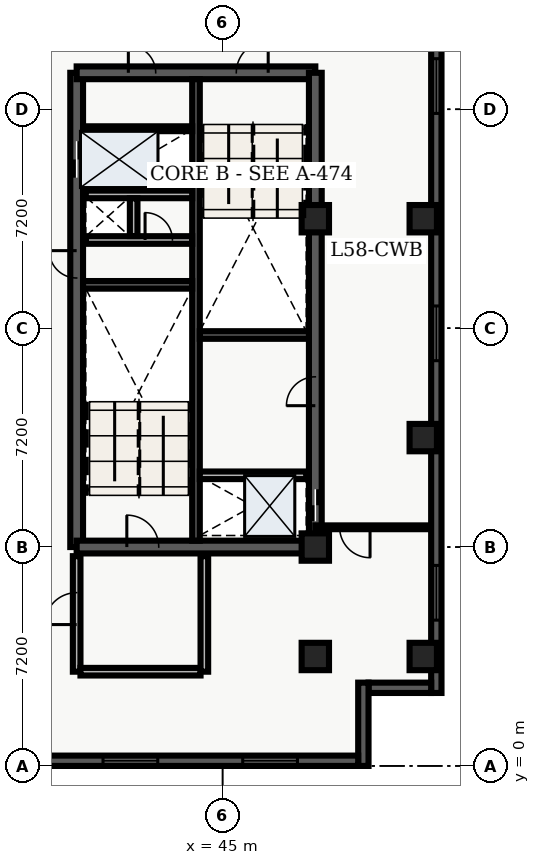
"""IFC4 building model, lengths in metres.
Left out: names, types, materials, properties, quantities, classifications, styles, units other than length and angle.
Written with IfcOpenShell. Run it as: python <this file> out.ifc"""

import sys

from ifc_helpers import new_model, entity, si_unit, converted_unit, direction, frame, origin_with_axes, origin_2d_with_axis, place, context, subcontext, project, spatial, polyline, rectangle, outline, extrude, element, fill, save


model = new_model("IFC4")
c1 = context("Model", 3, precision=1e-05, world=origin_with_axes(), true_north=direction((0.0, 1.0)))
c2 = subcontext(c1, "Body", "Model", "MODEL_VIEW")
j1 = project(units=[si_unit("LENGTHUNIT", "METRE"), converted_unit("PLANEANGLEUNIT", "DEGREE", entity("IfcPlaneAngleMeasure", 0.017), si_unit("PLANEANGLEUNIT", "RADIAN"), dimensions=[0, 0, 0, 0, 0, 0, 0])], contexts=[c1])
p1 = place(None, origin_with_axes())
s1 = spatial("IfcSite", under=j1, at=p1, CompositionType="ELEMENT")
p2 = place(p1, origin_with_axes())
s2 = spatial("IfcBuilding", under=s1, at=p2, CompositionType="ELEMENT")
p3 = place(p2, frame((0.0, 0.0, 236.4), z_axis=(0.0, 0.0, 1.0), x_axis=(1.0, 0.0, 0.0)))
s3 = spatial("IfcBuildingStorey", under=s2, at=p3, CompositionType="ELEMENT", Elevation=236.4)
p4 = place(p3, frame((40.2, 7.2, 0.0), z_axis=(0.0, 0.0, 1.0), x_axis=(0.0, 1.0, 0.0)))
e1 = element("IfcWall", 1, at=p4, inside=s3, PredefinedType="SHEAR", context=c2, shape_type="SweptSolid", body=[
    extrude(outline(polyline([(0.0, -0.21), (15.6, -0.21), (15.6, 0.21), (0.0, 0.21), (0.0, -0.21)])), origin_with_axes(), (0.0, 0.0, 1.0), 3.66),
])
p5 = place(p4, frame((12.75, 0.0, 0.0), z_axis=(0.0, 0.0, 1.0), x_axis=(1.0, 0.0, 0.0)))
e2 = element("IfcOpeningElement", 2, at=p5, cuts=e1, PredefinedType="OPENING", context=c2, shape_type="SweptSolid", body=[
    extrude(rectangle(XDim=1.2, YDim=0.44, at=origin_2d_with_axis()), origin_with_axes(), (0.0, 0.0, 1.0), 2.15),
])
p6 = place(p4, frame((9.3, 0.0, 0.0), z_axis=(0.0, 0.0, 1.0), x_axis=(1.0, 0.0, 0.0)))
e3 = element("IfcOpeningElement", 3, at=p6, cuts=e1, PredefinedType="OPENING", context=c2, shape_type="SweptSolid", body=[
    extrude(rectangle(XDim=0.9, YDim=0.44, at=origin_2d_with_axis()), origin_with_axes(), (0.0, 0.0, 1.0), 2.15),
])
p7 = place(p3, frame((40.2, 7.2, 0.0), z_axis=(0.0, 0.0, 1.0), x_axis=(1.0, 0.0, 0.0)))
e4 = element("IfcWall", 4, at=p7, inside=s3, PredefinedType="SHEAR", context=c2, shape_type="SweptSolid", body=[
    extrude(outline(polyline([(0.0, -0.21), (7.85, -0.21), (7.85, 0.21), (0.0, 0.21), (0.0, -0.21)])), origin_with_axes(), (0.0, 0.0, 1.0), 3.66),
])
p8 = place(p7, frame((2.175, 0.0, 0.0), z_axis=(0.0, 0.0, 1.0), x_axis=(1.0, 0.0, 0.0)))
e5 = element("IfcOpeningElement", 5, at=p8, cuts=e4, PredefinedType="OPENING", context=c2, shape_type="SweptSolid", body=[
    extrude(rectangle(XDim=1.05, YDim=0.44, at=origin_2d_with_axis()), origin_with_axes(), (0.0, 0.0, 1.0), 2.15),
])
p9 = place(p3, frame((40.2, 22.8, 0.0), z_axis=(0.0, 0.0, 1.0), x_axis=(1.0, 0.0, 0.0)))
e6 = element("IfcWall", 6, at=p9, inside=s3, PredefinedType="SHEAR", context=c2, shape_type="SweptSolid", body=[
    extrude(outline(polyline([(0.0, -0.21), (7.85, -0.21), (7.85, 0.21), (0.0, 0.21), (0.0, -0.21)])), origin_with_axes(), (0.0, 0.0, 1.0), 3.66),
])
p10 = place(p9, frame((5.775, 0.0, 0.0), z_axis=(0.0, 0.0, 1.0), x_axis=(1.0, 0.0, 0.0)))
e7 = element("IfcOpeningElement", 7, at=p10, cuts=e6, PredefinedType="OPENING", context=c2, shape_type="SweptSolid", body=[
    extrude(rectangle(XDim=1.05, YDim=0.44, at=origin_2d_with_axis()), origin_with_axes(), (0.0, 0.0, 1.0), 2.15),
])
p11 = place(p9, frame((2.15, 0.0, 0.0), z_axis=(0.0, 0.0, 1.0), x_axis=(1.0, 0.0, 0.0)))
e8 = element("IfcOpeningElement", 8, at=p11, cuts=e6, PredefinedType="OPENING", context=c2, shape_type="SweptSolid", body=[
    extrude(rectangle(XDim=0.9, YDim=0.44, at=origin_2d_with_axis()), origin_with_axes(), (0.0, 0.0, 1.0), 2.15),
])
p12 = place(p3, frame((48.05, 7.2, 0.0), z_axis=(0.0, 0.0, 1.0), x_axis=(0.0, 1.0, 0.0)))
e9 = element("IfcWall", 9, at=p12, inside=s3, PredefinedType="SHEAR", context=c2, shape_type="SweptSolid", body=[
    extrude(outline(polyline([(0.0, -0.21), (15.6, -0.21), (15.6, 0.21), (0.0, 0.21), (0.0, -0.21)])), origin_with_axes(), (0.0, 0.0, 1.0), 3.66),
])
p13 = place(p12, frame((1.375, 0.0, 0.0), z_axis=(0.0, 0.0, 1.0), x_axis=(1.0, 0.0, 0.0)))
e10 = element("IfcOpeningElement", 10, at=p13, cuts=e9, PredefinedType="OPENING", context=c2, shape_type="SweptSolid", body=[
    extrude(rectangle(XDim=1.05, YDim=0.44, at=origin_2d_with_axis()), origin_with_axes(), (0.0, 0.0, 1.0), 2.15),
])
p14 = place(p12, frame((5.125, 0.0, 0.0), z_axis=(0.0, 0.0, 1.0), x_axis=(1.0, 0.0, 0.0)))
e11 = element("IfcOpeningElement", 11, at=p14, cuts=e9, PredefinedType="OPENING", context=c2, shape_type="SweptSolid", body=[
    extrude(rectangle(XDim=0.95, YDim=0.44, at=origin_2d_with_axis()), origin_with_axes(), (0.0, 0.0, 1.0), 2.15),
])
p15 = place(p3, frame((44.125, 7.41, 0.0), z_axis=(0.0, 0.0, 1.0), x_axis=(0.0, 1.0, 0.0)))
e12 = element("IfcWall", 12, at=p15, inside=s3, PredefinedType="SHEAR", context=c2, shape_type="SweptSolid", body=[
    extrude(outline(polyline([(0.0, -0.125), (15.18, -0.125), (15.18, 0.125), (0.0, 0.125), (0.0, -0.125)])), origin_with_axes(), (0.0, 0.0, 1.0), 3.66),
])
for number, where, z_axis, x_axis in (
    (13, (40.41, 15.825, 0.0), (0.0, 0.0, 1.0), (1.0, 0.0, 0.0)),
    (14, (44.25, 14.175, 0.0), (0.0, 0.0, 1.0), (1.0, 0.0, 0.0)),
):
    element("IfcWall", number, at=place(p3, frame(where, z_axis=z_axis, x_axis=x_axis)), inside=s3, PredefinedType="SHEAR", context=c2, shape_type="SweptSolid", body=[
        extrude(outline(polyline([(0.0, -0.125), (3.59, -0.125), (3.59, 0.125), (0.0, 0.125), (0.0, -0.125)])), origin_with_axes(), (0.0, 0.0, 1.0), 3.66),
    ])
p16 = place(p3, frame((40.5, 17.3, 0.0), z_axis=(0.0, 0.0, 1.0), x_axis=(1.0, 0.0, 0.0)))
e15 = element("IfcWall", 15, at=p16, inside=s3, PredefinedType="SOLIDWALL", context=c2, shape_type="SweptSolid", body=[
    extrude(outline(polyline([(0.0, -0.125), (3.5, -0.125), (3.5, 0.125), (0.0, 0.125), (0.0, -0.125)])), origin_with_axes(), (0.0, 0.0, 1.0), 2.7),
])
p17 = place(p16, frame((2.4, 0.0, 0.0), z_axis=(0.0, 0.0, 1.0), x_axis=(1.0, 0.0, 0.0)))
e16 = element("IfcOpeningElement", 16, at=p17, cuts=e15, PredefinedType="OPENING", context=c2, shape_type="SweptSolid", body=[
    extrude(rectangle(XDim=0.9, YDim=0.27, at=origin_2d_with_axis()), origin_with_axes(), (0.0, 0.0, 1.0), 2.15),
])
p18 = place(p3, frame((40.5, 18.8, 0.0), z_axis=(0.0, 0.0, 1.0), x_axis=(1.0, 0.0, 0.0)))
e17 = element("IfcWall", 17, at=p18, inside=s3, PredefinedType="SOLIDWALL", context=c2, shape_type="SweptSolid", body=[
    extrude(outline(polyline([(0.0, -0.125), (3.5, -0.125), (3.5, 0.125), (0.0, 0.125), (0.0, -0.125)])), origin_with_axes(), (0.0, 0.0, 1.0), 2.7),
])
p19 = place(p3, frame((42.075, 17.43, 0.0), z_axis=(0.0, 0.0, 1.0), x_axis=(0.0, 1.0, 0.0)))
e18 = element("IfcWall", 18, at=p19, inside=s3, PredefinedType="SOLIDWALL", context=c2, shape_type="SweptSolid", body=[
    extrude(outline(polyline([(0.0, -0.125), (1.24, -0.125), (1.24, 0.125), (0.0, 0.125), (0.0, -0.125)])), origin_with_axes(), (0.0, 0.0, 1.0), 2.7),
])
p20 = place(p3, frame((40.2, 3.1, 0.0), z_axis=(0.0, 0.0, 1.0), x_axis=(0.0, 1.0, 0.0)))
e19 = element("IfcWall", 19, at=p20, inside=s3, PredefinedType="SOLIDWALL", context=c2, shape_type="SweptSolid", body=[
    extrude(outline(polyline([(0.0, -0.125), (3.8, -0.125), (3.8, 0.125), (0.0, 0.125), (0.0, -0.125)])), origin_with_axes(), (0.0, 0.0, 1.0), 2.7),
])
p21 = place(p20, frame((2.075, 0.0, 0.0), z_axis=(0.0, 0.0, 1.0), x_axis=(1.0, 0.0, 0.0)))
e20 = element("IfcOpeningElement", 20, at=p21, cuts=e19, PredefinedType="OPENING", context=c2, shape_type="SweptSolid", body=[
    extrude(rectangle(XDim=1.05, YDim=0.27, at=origin_2d_with_axis()), origin_with_axes(), (0.0, 0.0, 1.0), 2.15),
])
p22 = place(p3, frame((40.325, 3.1, 0.0), z_axis=(0.0, 0.0, 1.0), x_axis=(1.0, 0.0, 0.0)))
e21 = element("IfcWall", 21, at=p22, inside=s3, PredefinedType="SOLIDWALL", context=c2, shape_type="SweptSolid", body=[
    extrude(outline(polyline([(0.0, -0.125), (3.95, -0.125), (3.95, 0.125), (0.0, 0.125), (0.0, -0.125)])), origin_with_axes(), (0.0, 0.0, 1.0), 2.7),
])
p23 = place(p3, frame((44.4, 3.1, 0.0), z_axis=(0.0, 0.0, 1.0), x_axis=(0.0, 1.0, 0.0)))
e22 = element("IfcWall", 22, at=p23, inside=s3, PredefinedType="SOLIDWALL", context=c2, shape_type="SweptSolid", body=[
    extrude(outline(polyline([(0.0, -0.125), (3.8, -0.125), (3.8, 0.125), (0.0, 0.125), (0.0, -0.125)])), origin_with_axes(), (0.0, 0.0, 1.0), 2.7),
])
for number, where, z_axis, x_axis in (
    (23, (48.05, 3.6, 0.0), (0.0, 0.0, 1.0), (1.0, 0.0, 0.0)),
    (24, (48.05, 7.2, 0.0), (0.0, 0.0, 1.0), (1.0, 0.0, 0.0)),
    (25, (48.05, 18.0, 0.0), (0.0, 0.0, 1.0), (1.0, 0.0, 0.0)),
    (26, (51.6, 3.6, 0.0), (0.0, 0.0, 1.0), (1.0, 0.0, 0.0)),
    (27, (51.6, 10.8, 0.0), (0.0, 0.0, 1.0), (1.0, 0.0, 0.0)),
    (28, (51.6, 18.0, 0.0), (0.0, 0.0, 1.0), (1.0, 0.0, 0.0)),
):
    element("IfcColumn", number, at=place(p3, frame(where, z_axis=z_axis, x_axis=x_axis)), inside=s3, PredefinedType="COLUMN", context=c2, shape_type="SweptSolid", body=[
        extrude(rectangle(XDim=0.9, YDim=0.9, at=origin_2d_with_axis()), origin_with_axes(), (0.0, 0.0, 1.0), 3.9),
    ])
p24 = place(p3, frame((40.5, 20.96, 0.0), z_axis=(0.0, 0.0, 1.0), x_axis=(1.0, 0.0, 0.0)))
e29 = element("IfcWall", 29, at=p24, inside=s3, PredefinedType="PARTITIONING", context=c2, shape_type="SweptSolid", body=[
    extrude(outline(polyline([(0.0, -0.08), (3.5, -0.08), (3.5, 0.08), (0.0, 0.08), (0.0, -0.08)])), origin_with_axes(), (0.0, 0.0, 1.0), 2.7),
])
p25 = place(p3, frame((44.25, 9.56, 0.0), z_axis=(0.0, 0.0, 1.0), x_axis=(1.0, 0.0, 0.0)))
e30 = element("IfcWall", 30, at=p25, inside=s3, PredefinedType="SOLIDWALL", context=c2, shape_type="SweptSolid", body=[
    extrude(outline(polyline([(0.0, -0.125), (3.5, -0.125), (3.5, 0.125), (0.0, 0.125), (0.0, -0.125)])), origin_with_axes(), (0.0, 0.0, 1.0), 2.7),
])
p26 = place(p3, frame((51.865, 7.85, 0.0), z_axis=(0.0, 0.0, 1.0), x_axis=(-1.0, 0.0, 0.0)))
e31 = element("IfcWall", 31, at=p26, inside=s3, PredefinedType="PARTITIONING", context=c2, shape_type="SweptSolid", body=[
    extrude(outline(polyline([(0.0, -0.062), (3.815, -0.062), (3.815, 0.062), (0.0, 0.062), (0.0, -0.062)])), origin_with_axes(), (0.0, 0.0, 1.0), 2.7),
])
p27 = place(p26, frame((2.515, 0.0, 0.0), z_axis=(0.0, 0.0, 1.0), x_axis=(1.0, 0.0, 0.0)))
e32 = element("IfcOpeningElement", 32, at=p27, cuts=e31, PredefinedType="OPENING", context=c2, shape_type="SweptSolid", body=[
    extrude(rectangle(XDim=1.0, YDim=0.145, at=origin_2d_with_axis()), origin_with_axes(), (0.0, 0.0, 1.0), 2.15),
])
p28 = place(p3, frame((52.03, 26.06, 0.0), z_axis=(0.0, 0.0, 1.0), x_axis=(0.0, -1.0, 0.0)))
e33 = element("IfcWall", 33, at=p28, inside=s3, PredefinedType="SOLIDWALL", context=c2, shape_type="SweptSolid", body=[
    extrude(outline(polyline([(0.0, -0.17), (23.66, -0.17), (23.66, 0.17), (0.0, 0.17), (0.0, -0.17)])), origin_with_axes(), (0.0, 0.0, 1.0), 3.66),
])
p29 = place(p28, frame((3.696, 0.0, 0.45), z_axis=(0.0, 0.0, 1.0), x_axis=(1.0, 0.0, 0.0)))
e34 = element("IfcOpeningElement", 34, at=p29, cuts=e33, PredefinedType="OPENING", context=c2, shape_type="SweptSolid", body=[
    extrude(rectangle(XDim=1.8, YDim=0.36, at=origin_2d_with_axis()), origin_with_axes(), (0.0, 0.0, 1.0), 2.1),
])
p30 = place(p28, frame((11.83, 0.0, 0.45), z_axis=(0.0, 0.0, 1.0), x_axis=(1.0, 0.0, 0.0)))
e35 = element("IfcOpeningElement", 35, at=p30, cuts=e33, PredefinedType="OPENING", context=c2, shape_type="SweptSolid", body=[
    extrude(rectangle(XDim=1.8, YDim=0.36, at=origin_2d_with_axis()), origin_with_axes(), (0.0, 0.0, 1.0), 2.1),
])
p31 = place(p28, frame((20.364, 0.0, 0.45), z_axis=(0.0, 0.0, 1.0), x_axis=(1.0, 0.0, 0.0)))
e36 = element("IfcOpeningElement", 36, at=p31, cuts=e33, PredefinedType="OPENING", context=c2, shape_type="SweptSolid", body=[
    extrude(rectangle(XDim=1.8, YDim=0.36, at=origin_2d_with_axis()), origin_with_axes(), (0.0, 0.0, 1.0), 2.1),
])
p32 = place(p3, frame((51.86, 2.57, 0.0), z_axis=(0.0, 0.0, 1.0), x_axis=(-1.0, 0.0, 0.0)))
e37 = element("IfcWall", 37, at=p32, inside=s3, PredefinedType="SOLIDWALL", context=c2, shape_type="SweptSolid", body=[
    extrude(outline(polyline([(0.0, -0.17), (2.06, -0.17), (2.06, 0.17), (0.0, 0.17), (0.0, -0.17)])), origin_with_axes(), (0.0, 0.0, 1.0), 3.66),
])
p33 = place(p3, frame((49.63, 2.74, 0.0), z_axis=(0.0, 0.0, 1.0), x_axis=(0.0, -1.0, 0.0)))
e38 = element("IfcWall", 38, at=p33, inside=s3, PredefinedType="SOLIDWALL", context=c2, shape_type="SweptSolid", body=[
    extrude(outline(polyline([(0.0, -0.17), (2.74, -0.17), (2.74, 0.17), (0.0, 0.17), (0.0, -0.17)])), origin_with_axes(), (0.0, 0.0, 1.0), 3.66),
])
p34 = place(p3, frame((49.46, 0.17, 0.0), z_axis=(0.0, 0.0, 1.0), x_axis=(-1.0, 0.0, 0.0)))
e39 = element("IfcWall", 39, at=p34, inside=s3, PredefinedType="SOLIDWALL", context=c2, shape_type="SweptSolid", body=[
    extrude(outline(polyline([(0.0, -0.17), (42.56, -0.17), (42.56, 0.17), (0.0, 0.17), (0.0, -0.17)])), origin_with_axes(), (0.0, 0.0, 1.0), 3.66),
])
p35 = place(p34, frame((2.898, 0.0, 0.45), z_axis=(0.0, 0.0, 1.0), x_axis=(1.0, 0.0, 0.0)))
e40 = element("IfcOpeningElement", 40, at=p35, cuts=e39, PredefinedType="OPENING", context=c2, shape_type="SweptSolid", body=[
    extrude(rectangle(XDim=1.8, YDim=0.36, at=origin_2d_with_axis()), origin_with_axes(), (0.0, 0.0, 1.0), 2.1),
])
p36 = place(p34, frame((7.493, 0.0, 0.45), z_axis=(0.0, 0.0, 1.0), x_axis=(1.0, 0.0, 0.0)))
e41 = element("IfcOpeningElement", 41, at=p36, cuts=e39, PredefinedType="OPENING", context=c2, shape_type="SweptSolid", body=[
    extrude(rectangle(XDim=1.8, YDim=0.36, at=origin_2d_with_axis()), origin_with_axes(), (0.0, 0.0, 1.0), 2.1),
])
p37 = place(p34, frame((12.089, 0.0, 0.45), z_axis=(0.0, 0.0, 1.0), x_axis=(1.0, 0.0, 0.0)))
e42 = element("IfcOpeningElement", 42, at=p37, cuts=e39, PredefinedType="OPENING", context=c2, shape_type="SweptSolid", body=[
    extrude(rectangle(XDim=1.8, YDim=0.36, at=origin_2d_with_axis()), origin_with_axes(), (0.0, 0.0, 1.0), 2.1),
])
p38 = place(p34, frame((16.234, 0.0, 0.45), z_axis=(0.0, 0.0, 1.0), x_axis=(1.0, 0.0, 0.0)))
e43 = element("IfcOpeningElement", 43, at=p38, cuts=e39, PredefinedType="OPENING", context=c2, shape_type="SweptSolid", body=[
    extrude(rectangle(XDim=1.8, YDim=0.36, at=origin_2d_with_axis()), origin_with_axes(), (0.0, 0.0, 1.0), 2.1),
])
p39 = place(p34, frame((25.876, 0.0, 0.45), z_axis=(0.0, 0.0, 1.0), x_axis=(1.0, 0.0, 0.0)))
e44 = element("IfcOpeningElement", 44, at=p39, cuts=e39, PredefinedType="OPENING", context=c2, shape_type="SweptSolid", body=[
    extrude(rectangle(XDim=1.8, YDim=0.36, at=origin_2d_with_axis()), origin_with_axes(), (0.0, 0.0, 1.0), 2.1),
])
p40 = place(p34, frame((30.471, 0.0, 0.45), z_axis=(0.0, 0.0, 1.0), x_axis=(1.0, 0.0, 0.0)))
e45 = element("IfcOpeningElement", 45, at=p40, cuts=e39, PredefinedType="OPENING", context=c2, shape_type="SweptSolid", body=[
    extrude(rectangle(XDim=1.8, YDim=0.36, at=origin_2d_with_axis()), origin_with_axes(), (0.0, 0.0, 1.0), 2.1),
])
p41 = place(p34, frame((35.067, 0.0, 0.45), z_axis=(0.0, 0.0, 1.0), x_axis=(1.0, 0.0, 0.0)))
e46 = element("IfcOpeningElement", 46, at=p41, cuts=e39, PredefinedType="OPENING", context=c2, shape_type="SweptSolid", body=[
    extrude(rectangle(XDim=1.8, YDim=0.36, at=origin_2d_with_axis()), origin_with_axes(), (0.0, 0.0, 1.0), 2.1),
])
p42 = place(p34, frame((39.662, 0.0, 0.45), z_axis=(0.0, 0.0, 1.0), x_axis=(1.0, 0.0, 0.0)))
e47 = element("IfcOpeningElement", 47, at=p42, cuts=e39, PredefinedType="OPENING", context=c2, shape_type="SweptSolid", body=[
    extrude(rectangle(XDim=1.8, YDim=0.36, at=origin_2d_with_axis()), origin_with_axes(), (0.0, 0.0, 1.0), 2.1),
])
p43 = place(p12, frame((1.375, 0.0, 0.0), z_axis=(0.0, 0.0, 1.0), x_axis=(1.0, 0.0, 0.0)))
e48 = element("IfcDoor", 48, at=p43, inside=s3, OperationType="SLIDING_TO_LEFT", PredefinedType="DOOR", context=c2, shape_type="SweptSolid", body=[
    extrude(rectangle(XDim=1.05, YDim=0.09, at=origin_2d_with_axis()), origin_with_axes(), (0.0, 0.0, 1.0), 2.15),
])
fill(e10, e48)
p44 = place(p4, frame((12.75, 0.0, 0.0), z_axis=(0.0, 0.0, 1.0), x_axis=(1.0, 0.0, 0.0)))
e49 = element("IfcDoor", 49, at=p44, inside=s3, OperationType="DOUBLE_DOOR_SLIDING", PredefinedType="DOOR", context=c2, shape_type="SweptSolid", body=[
    extrude(rectangle(XDim=1.2, YDim=0.09, at=origin_2d_with_axis()), origin_with_axes(), (0.0, 0.0, 1.0), 2.15),
])
fill(e2, e49)
p45 = place(p4, frame((9.3, 0.0, 0.0), z_axis=(0.0, 0.0, 1.0), x_axis=(1.0, 0.0, 0.0)))
e50 = element("IfcDoor", 50, at=p45, inside=s3, OperationType="SINGLE_SWING_RIGHT", PredefinedType="DOOR", context=c2, shape_type="SweptSolid", body=[
    extrude(rectangle(XDim=0.9, YDim=0.09, at=origin_2d_with_axis()), origin_with_axes(), (0.0, 0.0, 1.0), 2.15),
])
fill(e3, e50)
p46 = place(p16, frame((2.4, 0.0, 0.0), z_axis=(0.0, 0.0, 1.0), x_axis=(1.0, 0.0, 0.0)))
e51 = element("IfcDoor", 51, at=p46, inside=s3, OperationType="SINGLE_SWING_LEFT", PredefinedType="DOOR", context=c2, shape_type="SweptSolid", body=[
    extrude(rectangle(XDim=0.9, YDim=0.09, at=origin_2d_with_axis()), origin_with_axes(), (0.0, 0.0, 1.0), 2.15),
])
fill(e16, e51)
p47 = place(p7, frame((2.175, 0.0, 0.0), z_axis=(0.0, 0.0, 1.0), x_axis=(1.0, 0.0, 0.0)))
e52 = element("IfcDoor", 52, at=p47, inside=s3, OperationType="SINGLE_SWING_LEFT", PredefinedType="DOOR", context=c2, shape_type="SweptSolid", body=[
    extrude(rectangle(XDim=1.05, YDim=0.09, at=origin_2d_with_axis()), origin_with_axes(), (0.0, 0.0, 1.0), 2.15),
])
fill(e5, e52)
p48 = place(p9, frame((5.775, 0.0, 0.0), z_axis=(0.0, 0.0, 1.0), x_axis=(1.0, 0.0, 0.0)))
e53 = element("IfcDoor", 53, at=p48, inside=s3, OperationType="SINGLE_SWING_RIGHT", PredefinedType="DOOR", context=c2, shape_type="SweptSolid", body=[
    extrude(rectangle(XDim=1.05, YDim=0.09, at=origin_2d_with_axis()), origin_with_axes(), (0.0, 0.0, 1.0), 2.15),
])
fill(e7, e53)
p49 = place(p20, frame((2.075, 0.0, 0.0), z_axis=(0.0, 0.0, 1.0), x_axis=(1.0, 0.0, 0.0)))
e54 = element("IfcDoor", 54, at=p49, inside=s3, OperationType="SINGLE_SWING_LEFT", PredefinedType="DOOR", context=c2, shape_type="SweptSolid", body=[
    extrude(rectangle(XDim=1.05, YDim=0.09, at=origin_2d_with_axis()), origin_with_axes(), (0.0, 0.0, 1.0), 2.15),
])
fill(e20, e54)
p50 = place(p9, frame((2.15, 0.0, 0.0), z_axis=(0.0, 0.0, 1.0), x_axis=(1.0, 0.0, 0.0)))
e55 = element("IfcDoor", 55, at=p50, inside=s3, OperationType="SINGLE_SWING_LEFT", PredefinedType="DOOR", context=c2, shape_type="SweptSolid", body=[
    extrude(rectangle(XDim=0.9, YDim=0.09, at=origin_2d_with_axis()), origin_with_axes(), (0.0, 0.0, 1.0), 2.15),
])
fill(e8, e55)
p51 = place(p12, frame((5.125, 0.0, 0.0), z_axis=(0.0, 0.0, 1.0), x_axis=(1.0, 0.0, 0.0)))
e56 = element("IfcDoor", 56, at=p51, inside=s3, OperationType="SINGLE_SWING_LEFT", PredefinedType="DOOR", context=c2, shape_type="SweptSolid", body=[
    extrude(rectangle(XDim=0.95, YDim=0.09, at=origin_2d_with_axis()), origin_with_axes(), (0.0, 0.0, 1.0), 2.15),
])
fill(e11, e56)
p52 = place(p26, frame((2.515, 0.0, 0.0), z_axis=(0.0, 0.0, 1.0), x_axis=(1.0, 0.0, 0.0)))
e57 = element("IfcDoor", 57, at=p52, inside=s3, OperationType="SINGLE_SWING_LEFT", PredefinedType="DOOR", context=c2, shape_type="SweptSolid", body=[
    extrude(rectangle(XDim=1.0, YDim=0.075, at=origin_2d_with_axis()), origin_with_axes(), (0.0, 0.0, 1.0), 2.15),
])
fill(e32, e57)
p53 = place(p28, frame((3.696, 0.0, 0.45), z_axis=(0.0, 0.0, 1.0), x_axis=(1.0, 0.0, 0.0)))
e58 = element("IfcWindow", 58, at=p53, inside=s3, PredefinedType="WINDOW", context=c2, shape_type="SweptSolid", body=[
    extrude(rectangle(XDim=1.8, YDim=0.09, at=origin_2d_with_axis()), origin_with_axes(), (0.0, 0.0, 1.0), 2.1),
])
fill(e34, e58)
p54 = place(p28, frame((11.83, 0.0, 0.45), z_axis=(0.0, 0.0, 1.0), x_axis=(1.0, 0.0, 0.0)))
e59 = element("IfcWindow", 59, at=p54, inside=s3, PredefinedType="WINDOW", context=c2, shape_type="SweptSolid", body=[
    extrude(rectangle(XDim=1.8, YDim=0.09, at=origin_2d_with_axis()), origin_with_axes(), (0.0, 0.0, 1.0), 2.1),
])
fill(e35, e59)
p55 = place(p28, frame((20.364, 0.0, 0.45), z_axis=(0.0, 0.0, 1.0), x_axis=(1.0, 0.0, 0.0)))
e60 = element("IfcWindow", 60, at=p55, inside=s3, PredefinedType="WINDOW", context=c2, shape_type="SweptSolid", body=[
    extrude(rectangle(XDim=1.8, YDim=0.09, at=origin_2d_with_axis()), origin_with_axes(), (0.0, 0.0, 1.0), 2.1),
])
fill(e36, e60)
p56 = place(p34, frame((2.898, 0.0, 0.45), z_axis=(0.0, 0.0, 1.0), x_axis=(1.0, 0.0, 0.0)))
e61 = element("IfcWindow", 61, at=p56, inside=s3, PredefinedType="WINDOW", context=c2, shape_type="SweptSolid", body=[
    extrude(rectangle(XDim=1.8, YDim=0.09, at=origin_2d_with_axis()), origin_with_axes(), (0.0, 0.0, 1.0), 2.1),
])
fill(e40, e61)
p57 = place(p34, frame((7.493, 0.0, 0.45), z_axis=(0.0, 0.0, 1.0), x_axis=(1.0, 0.0, 0.0)))
e62 = element("IfcWindow", 62, at=p57, inside=s3, PredefinedType="WINDOW", context=c2, shape_type="SweptSolid", body=[
    extrude(rectangle(XDim=1.8, YDim=0.09, at=origin_2d_with_axis()), origin_with_axes(), (0.0, 0.0, 1.0), 2.1),
])
fill(e41, e62)
save(model, sys.argv[1])
